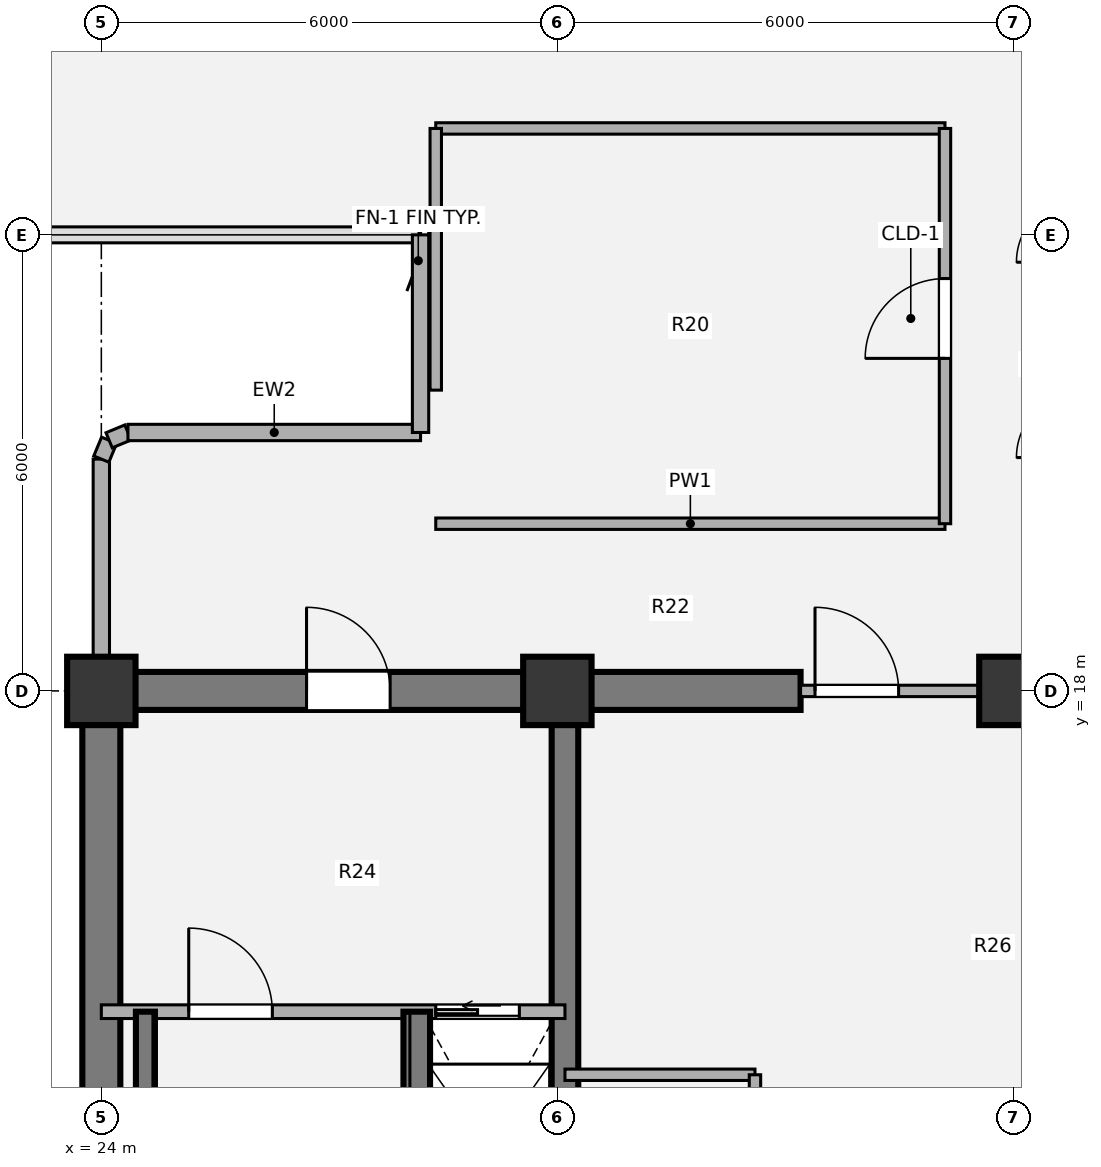
"""IFC4 building model, lengths in metres.
Left out: names, types, materials, properties, quantities, classifications, styles, units other than length and angle.
Written with IfcOpenShell. Run it as: python <this file> out.ifc"""

import sys

from ifc_helpers import new_model, si_unit, direction, frame, frame_2d, origin, origin_2d, place, context, subcontext, project, spatial, rectangle, extrude, source, transform, mapped, element, fill, save


model = new_model("IFC4")
c1 = context("Model", 3, precision=1e-05, world=origin(), true_north=direction((0.0, 1.0)))
c2 = subcontext(c1, "Body", "Model", "MODEL_VIEW")
j1 = project(units=[si_unit("LENGTHUNIT", "METRE"), si_unit("PLANEANGLEUNIT", "RADIAN")], contexts=[c1])
p1 = place(None, origin())
s1 = spatial("IfcSite", under=j1, at=p1, CompositionType="ELEMENT")
p2 = place(p1, origin())
s2 = spatial("IfcBuilding", under=s1, at=p2, CompositionType="ELEMENT")
p3 = place(p2, frame((0.0, 0.0, 93.6)))
s3 = spatial("IfcBuildingStorey", under=s2, at=p3, CompositionType="ELEMENT", Elevation=93.6)
m1 = source(origin(), c2, "Body", "SweptSolid", [
    extrude(rectangle(XDim=0.9, YDim=0.9, at=origin_2d()), origin(), (0.0, 0.0, 1.0), 3.78),
])
for number, where, z_axis, x_axis in (
    (1, (24.0, 18.0, 0.0), (0.0, 0.0, 1.0), (1.0, 0.0, 0.0)),
    (2, (30.0, 18.0, 0.0), (0.0, 0.0, 1.0), (1.0, 0.0, 0.0)),
    (3, (36.0, 18.0, 0.0), (0.0, 0.0, 1.0), (1.0, 0.0, 0.0)),
):
    element("IfcColumn", number, at=place(p3, frame(where, z_axis=z_axis, x_axis=x_axis)), inside=s3, PredefinedType="COLUMN", context=c2, shape_type="MappedRepresentation", body=[
        mapped(m1, transform((0.0, 0.0, 0.0), x_axis=(1.0, 0.0, 0.0), y_axis=(0.0, 1.0, 0.0), z_axis=(0.0, 0.0, 1.0), scale=1.0)),
    ])
p4 = place(p3, frame((24.0, 6.0, 0.0), z_axis=(0.0, 0.0, 1.0), x_axis=(0.0, 1.0, 0.0)))
e4 = element("IfcWall", 4, at=p4, inside=s3, PredefinedType="SHEAR", context=c2, shape_type="SweptSolid", body=[
    extrude(rectangle(XDim=12.0, YDim=0.5, at=frame_2d((6.0, 0.0))), origin(), (0.0, 0.0, 1.0), 3.78),
])
p5 = place(p3, frame((23.75, 18.0, 0.0), z_axis=(0.0, 0.0, 1.0), x_axis=(1.0, 0.0, 0.0)))
e5 = element("IfcWall", 5, at=p5, inside=s3, PredefinedType="SHEAR", context=c2, shape_type="SweptSolid", body=[
    extrude(rectangle(XDim=9.45, YDim=0.5, at=frame_2d((4.725, 0.0))), origin(), (0.0, 0.0, 1.0), 3.78),
])
p6 = place(p5, frame((2.95, 0.0, 0.0)))
e6 = element("IfcOpeningElement", 6, at=p6, cuts=e5, PredefinedType="OPENING", context=c2, shape_type="SweptSolid", body=[
    extrude(rectangle(XDim=1.1, YDim=2.1, at=origin_2d()), frame((0.55, 0.26, 1.05), z_axis=(0.0, -1.0, 0.0), x_axis=(1.0, 0.0, 0.0)), (0.0, 0.0, 1.0), 0.52),
])
p7 = place(p3, frame((30.1, 6.0, 0.0), z_axis=(0.0, 0.0, 1.0), x_axis=(0.0, 1.0, 0.0)))
e7 = element("IfcWall", 7, at=p7, inside=s3, PredefinedType="SHEAR", context=c2, shape_type="SweptSolid", body=[
    extrude(rectangle(XDim=12.0, YDim=0.35, at=frame_2d((6.0, 0.0))), origin(), (0.0, 0.0, 1.0), 3.78),
])
p8 = place(p3, frame((24.0, 18.43, 0.0), z_axis=(0.0, 0.0, 1.0), x_axis=(0.0, 1.0, 0.0)))
e8 = element("IfcWall", 8, at=p8, inside=s3, PredefinedType="SOLIDWALL", context=c2, shape_type="SweptSolid", body=[
    extrude(rectangle(XDim=2.62, YDim=0.215, at=frame_2d((1.31, 0.0))), origin(), (0.0, 0.0, 1.0), 3.53),
])
p9 = place(p3, frame((24.0, 21.05, 0.0), z_axis=(0.0, 0.0, 1.0), x_axis=(0.382673670509, 0.923883575944, 0.0)))
e9 = element("IfcWall", 9, at=p9, inside=s3, PredefinedType="SOLIDWALL", context=c2, shape_type="SweptSolid", body=[
    extrude(rectangle(XDim=0.268, YDim=0.215, at=frame_2d((0.134, 0.0))), origin(), (0.0, 0.0, 1.0), 3.53),
])
p10 = place(p3, frame((24.103, 21.298, 0.0), z_axis=(0.0, 0.0, 1.0), x_axis=(0.924205486139, 0.381895560841, 0.0)))
e10 = element("IfcWall", 10, at=p10, inside=s3, PredefinedType="SOLIDWALL", context=c2, shape_type="SweptSolid", body=[
    extrude(rectangle(XDim=0.268, YDim=0.215, at=frame_2d((0.134, 0.0))), origin(), (0.0, 0.0, 1.0), 3.53),
])
p11 = place(p3, frame((24.35, 21.4, 0.0), z_axis=(0.0, 0.0, 1.0), x_axis=(1.0, 0.0, 0.0)))
e11 = element("IfcWall", 11, at=p11, inside=s3, PredefinedType="SOLIDWALL", context=c2, shape_type="SweptSolid", body=[
    extrude(rectangle(XDim=3.85, YDim=0.215, at=frame_2d((1.925, 0.0))), origin(), (0.0, 0.0, 1.0), 3.53),
])
p12 = place(p3, frame((28.2, 21.4, 0.0), z_axis=(0.0, 0.0, 1.0), x_axis=(0.0, 1.0, 0.0)))
e12 = element("IfcWall", 12, at=p12, inside=s3, PredefinedType="SOLIDWALL", context=c2, shape_type="SweptSolid", body=[
    extrude(rectangle(XDim=2.6, YDim=0.215, at=frame_2d((1.3, 0.0))), origin(), (0.0, 0.0, 1.0), 3.53),
])
p13 = place(p3, frame((30.1, 12.95, 0.0), z_axis=(0.0, 0.0, 1.0), x_axis=(1.0, 0.0, 0.0)))
e13 = element("IfcWall", 13, at=p13, inside=s3, PredefinedType="PARTITIONING", context=c2, shape_type="SweptSolid", body=[
    extrude(rectangle(XDim=2.5, YDim=0.15, at=frame_2d((1.25, 0.0))), origin(), (0.0, 0.0, 1.0), 3.5),
])
p14 = place(p3, frame((32.6, 11.0, 0.0), z_axis=(0.0, 0.0, 1.0), x_axis=(0.0, 1.0, 0.0)))
e14 = element("IfcWall", 14, at=p14, inside=s3, PredefinedType="PARTITIONING", context=c2, shape_type="SweptSolid", body=[
    extrude(rectangle(XDim=1.95, YDim=0.15, at=frame_2d((0.975, 0.0))), origin(), (0.0, 0.0, 1.0), 3.5),
])
p15 = place(p14, frame((0.55, 0.0, 0.0)))
e15 = element("IfcOpeningElement", 15, at=p15, cuts=e14, PredefinedType="OPENING", context=c2, shape_type="SweptSolid", body=[
    extrude(rectangle(XDim=0.86, YDim=2.1, at=origin_2d()), frame((0.43, 0.085, 1.05), z_axis=(0.0, -1.0, 0.0), x_axis=(1.0, 0.0, 0.0)), (0.0, 0.0, 1.0), 0.17),
])
p16 = place(p3, frame((33.2, 18.0, 0.0), z_axis=(0.0, 0.0, 1.0), x_axis=(1.0, 0.0, 0.0)))
e16 = element("IfcWall", 16, at=p16, inside=s3, PredefinedType="PARTITIONING", context=c2, shape_type="SweptSolid", body=[
    extrude(rectangle(XDim=5.6, YDim=0.15, at=frame_2d((2.8, 0.0))), origin(), (0.0, 0.0, 1.0), 2.315),
])
p17 = place(p16, frame((0.19, 0.0, 0.0)))
e17 = element("IfcOpeningElement", 17, at=p17, cuts=e16, PredefinedType="OPENING", context=c2, shape_type="SweptSolid", body=[
    extrude(rectangle(XDim=1.1, YDim=2.1, at=origin_2d()), frame((0.55, 0.085, 1.05), z_axis=(0.0, -1.0, 0.0), x_axis=(1.0, 0.0, 0.0)), (0.0, 0.0, 1.0), 0.17),
])
p18 = place(p16, frame((4.31, 0.0, 0.0)))
e18 = element("IfcOpeningElement", 18, at=p18, cuts=e16, PredefinedType="OPENING", context=c2, shape_type="SweptSolid", body=[
    extrude(rectangle(XDim=1.1, YDim=2.1, at=origin_2d()), frame((0.55, 0.085, 1.05), z_axis=(0.0, -1.0, 0.0), x_axis=(1.0, 0.0, 0.0)), (0.0, 0.0, 1.0), 0.17),
])
p19 = place(p3, frame((24.0, 13.78, 0.0), z_axis=(0.0, 0.0, 1.0), x_axis=(1.0, 0.0, 0.0)))
e19 = element("IfcWall", 19, at=p19, inside=s3, PredefinedType="PARTITIONING", context=c2, shape_type="SweptSolid", body=[
    extrude(rectangle(XDim=6.1, YDim=0.18, at=frame_2d((3.05, 0.0))), origin(), (0.0, 0.0, 1.0), 3.5),
])
p20 = place(p19, frame((1.15, 0.0, 0.0)))
e20 = element("IfcOpeningElement", 20, at=p20, cuts=e19, PredefinedType="OPENING", context=c2, shape_type="SweptSolid", body=[
    extrude(rectangle(XDim=1.1, YDim=2.1, at=origin_2d()), frame((0.55, 0.1, 1.05), z_axis=(0.0, -1.0, 0.0), x_axis=(1.0, 0.0, 0.0)), (0.0, 0.0, 1.0), 0.2),
])
p21 = place(p19, frame((4.4, 0.0, 0.0)))
e21 = element("IfcOpeningElement", 21, at=p21, cuts=e19, PredefinedType="OPENING", context=c2, shape_type="SweptSolid", body=[
    extrude(rectangle(XDim=1.1, YDim=2.1, at=origin_2d()), frame((0.55, 0.1, 1.05), z_axis=(0.0, -1.0, 0.0), x_axis=(1.0, 0.0, 0.0)), (0.0, 0.0, 1.0), 0.2),
])
p22 = place(p3, frame((28.15, 6.0, 0.0), z_axis=(0.0, 0.0, 1.0), x_axis=(0.0, 1.0, 0.0)))
e22 = element("IfcWall", 22, at=p22, inside=s3, PredefinedType="SHEAR", context=c2, shape_type="SweptSolid", body=[
    extrude(rectangle(XDim=7.78, YDim=0.35, at=frame_2d((3.89, 0.0))), origin(), (0.0, 0.0, 1.0), 3.85),
])
p23 = place(p3, frame((24.58, 6.0, 0.0), z_axis=(0.0, 0.0, 1.0), x_axis=(0.0, 1.0, 0.0)))
e23 = element("IfcWall", 23, at=p23, inside=s3, PredefinedType="SHEAR", context=c2, shape_type="SweptSolid", body=[
    extrude(rectangle(XDim=7.78, YDim=0.25, at=frame_2d((3.89, 0.0))), origin(), (0.0, 0.0, 1.0), 3.85),
])
for number, where, z_axis, x_axis in (
    (24, (28.4, 20.2, 0.0), (0.0, 0.0, 1.0), (1.0, 0.0, 0.0)),
    (25, (28.4, 25.4, 0.0), (0.0, 0.0, 1.0), (1.0, 0.0, 0.0)),
):
    element("IfcWall", number, at=place(p3, frame(where, z_axis=z_axis, x_axis=x_axis)), inside=s3, PredefinedType="PARTITIONING", context=c2, shape_type="SweptSolid", body=[
        extrude(rectangle(XDim=6.7, YDim=0.15, at=frame_2d((3.35, 0.0))), origin(), (0.0, 0.0, 1.0), 3.5),
    ])
p24 = place(p3, frame((28.4, 21.957, 0.0), z_axis=(0.0, 0.0, 1.0), x_axis=(0.0, 1.0, 0.0)))
e26 = element("IfcWall", 26, at=p24, inside=s3, PredefinedType="PARTITIONING", context=c2, shape_type="SweptSolid", body=[
    extrude(rectangle(XDim=3.443, YDim=0.15, at=frame_2d((1.721, 0.0))), origin(), (0.0, 0.0, 1.0), 3.5),
])
p25 = place(p3, frame((35.1, 20.2, 0.0), z_axis=(0.0, 0.0, 1.0), x_axis=(0.0, 1.0, 0.0)))
e27 = element("IfcWall", 27, at=p25, inside=s3, PredefinedType="PARTITIONING", context=c2, shape_type="SweptSolid", body=[
    extrude(rectangle(XDim=5.2, YDim=0.15, at=frame_2d((2.6, 0.0))), origin(), (0.0, 0.0, 1.0), 3.5),
])
p26 = place(p25, frame((2.175, 0.0, 0.0)))
e28 = element("IfcOpeningElement", 28, at=p26, cuts=e27, PredefinedType="OPENING", context=c2, shape_type="SweptSolid", body=[
    extrude(rectangle(XDim=1.05, YDim=2.1, at=origin_2d()), frame((0.525, 0.085, 1.05), z_axis=(0.0, -1.0, 0.0), x_axis=(1.0, 0.0, 0.0)), (0.0, 0.0, 1.0), 0.17),
])
m2 = source(origin(), c2, "Body", "SweptSolid", [
    extrude(rectangle(XDim=1.1, YDim=2.1, at=origin_2d()), frame((0.55, 0.025, 1.05), z_axis=(0.0, -1.0, 0.0), x_axis=(1.0, 0.0, 0.0)), (0.0, 0.0, 1.0), 0.05),
])
p27 = place(p17, origin())
e29 = element("IfcDoor", 29, at=p27, inside=s3, OperationType="SINGLE_SWING_LEFT", PredefinedType="DOOR", context=c2, shape_type="MappedRepresentation", body=[
    mapped(m2, transform((0.0, 0.0, 0.0), x_axis=(1.0, 0.0, 0.0), y_axis=(0.0, 1.0, 0.0), z_axis=(0.0, 0.0, 1.0), scale=1.0)),
])
fill(e17, e29)
m3 = source(origin(), c2, "Body", "SweptSolid", [
    extrude(rectangle(XDim=1.1, YDim=2.1, at=origin_2d()), frame((0.55, 0.025, 1.05), z_axis=(0.0, -1.0, 0.0), x_axis=(1.0, 0.0, 0.0)), (0.0, 0.0, 1.0), 0.05),
])
p28 = place(p20, origin())
e30 = element("IfcDoor", 30, at=p28, inside=s3, OperationType="SINGLE_SWING_LEFT", PredefinedType="DOOR", context=c2, shape_type="MappedRepresentation", body=[
    mapped(m3, transform((0.0, 0.0, 0.0), x_axis=(1.0, 0.0, 0.0), y_axis=(0.0, 1.0, 0.0), z_axis=(0.0, 0.0, 1.0), scale=1.0)),
])
fill(e20, e30)
m4 = source(origin(), c2, "Body", "SweptSolid", [
    extrude(rectangle(XDim=1.1, YDim=2.1, at=origin_2d()), frame((0.55, 0.025, 1.05), z_axis=(0.0, -1.0, 0.0), x_axis=(1.0, 0.0, 0.0)), (0.0, 0.0, 1.0), 0.05),
])
p29 = place(p21, origin())
e31 = element("IfcDoor", 31, at=p29, inside=s3, OperationType="SLIDING_TO_LEFT", PredefinedType="DOOR", context=c2, shape_type="MappedRepresentation", body=[
    mapped(m4, transform((0.0, 0.0, 0.0), x_axis=(1.0, 0.0, 0.0), y_axis=(0.0, 1.0, 0.0), z_axis=(0.0, 0.0, 1.0), scale=1.0)),
])
fill(e21, e31)
p30 = place(p6, origin())
e32 = element("IfcDoor", 32, at=p30, inside=s3, OperationType="SINGLE_SWING_LEFT", PredefinedType="DOOR", context=c2, shape_type="MappedRepresentation", body=[
    mapped(m2, transform((0.0, 0.0, 0.0), x_axis=(1.0, 0.0, 0.0), y_axis=(0.0, 1.0, 0.0), z_axis=(0.0, 0.0, 1.0), scale=1.0)),
])
fill(e6, e32)
m5 = source(origin(), c2, "Body", "SweptSolid", [
    extrude(rectangle(XDim=1.05, YDim=2.1, at=origin_2d()), frame((0.525, 0.025, 1.05), z_axis=(0.0, -1.0, 0.0), x_axis=(1.0, 0.0, 0.0)), (0.0, 0.0, 1.0), 0.05),
])
p31 = place(p26, origin())
e33 = element("IfcDoor", 33, at=p31, inside=s3, OperationType="SINGLE_SWING_LEFT", PredefinedType="DOOR", context=c2, shape_type="MappedRepresentation", body=[
    mapped(m5, transform((0.0, 0.0, 0.0), x_axis=(1.0, 0.0, 0.0), y_axis=(0.0, 1.0, 0.0), z_axis=(0.0, 0.0, 1.0), scale=1.0)),
])
fill(e28, e33)
save(model, sys.argv[1])
